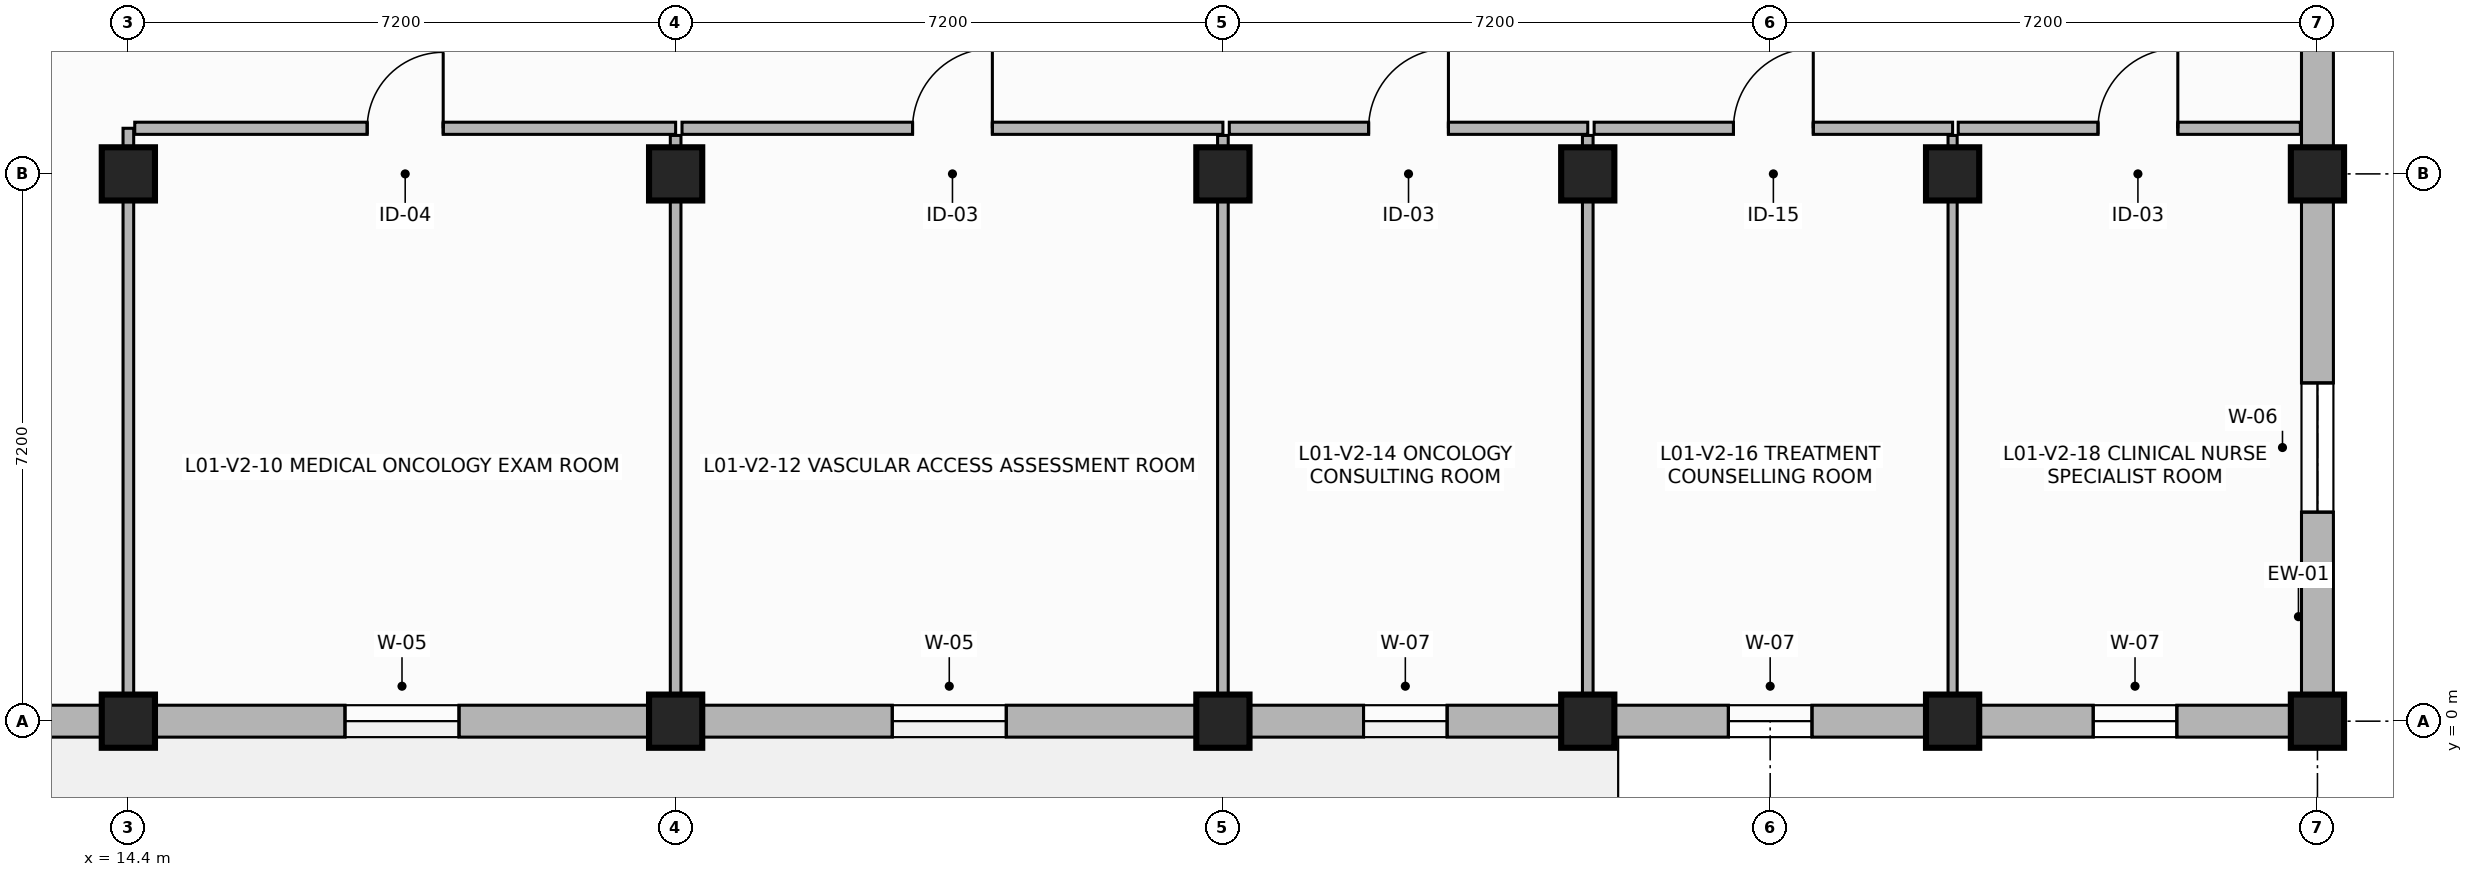
"""IFC4 building model, lengths in metres.
Left out: names, types, materials, properties, quantities, classifications, styles, units other than length and angle.
Written with IfcOpenShell. Run it as: python <this file> out.ifc"""

import sys

from ifc_helpers import new_model, si_unit, direction, frame, frame_2d, origin, origin_2d, place, context, subcontext, project, spatial, rectangle, extrude, element, fill, save


model = new_model("IFC4")
c1 = context("Model", 3, precision=1e-05, world=origin(), true_north=direction((0.0, 1.0)))
c2 = subcontext(c1, "Body", "Model", "MODEL_VIEW")
j1 = project(units=[si_unit("LENGTHUNIT", "METRE"), si_unit("PLANEANGLEUNIT", "RADIAN")], contexts=[c1])
p1 = place(None, origin())
s1 = spatial("IfcSite", under=j1, at=p1, CompositionType="ELEMENT")
p2 = place(p1, origin())
s2 = spatial("IfcBuilding", under=s1, at=p2, CompositionType="ELEMENT")
p3 = place(p2, frame((0.0, 0.0, 4.5)))
s3 = spatial("IfcBuildingStorey", under=s2, at=p3, CompositionType="ELEMENT", Elevation=4.5)
for number, where, z_axis, x_axis in (
    (1, (14.4, 0.0, 0.0), (0.0, 0.0, 1.0), (1.0, 0.0, 0.0)),
    (2, (14.4, 7.2, 0.0), (0.0, 0.0, 1.0), (1.0, 0.0, 0.0)),
    (3, (21.6, 0.0, 0.0), (0.0, 0.0, 1.0), (1.0, 0.0, 0.0)),
    (4, (21.6, 7.2, 0.0), (0.0, 0.0, 1.0), (1.0, 0.0, 0.0)),
    (5, (28.8, 0.0, 0.0), (0.0, 0.0, 1.0), (1.0, 0.0, 0.0)),
    (6, (28.8, 7.2, 0.0), (0.0, 0.0, 1.0), (1.0, 0.0, 0.0)),
    (7, (33.6, 0.0, 0.0), (0.0, 0.0, 1.0), (1.0, 0.0, 0.0)),
    (8, (33.6, 7.2, 0.0), (0.0, 0.0, 1.0), (1.0, 0.0, 0.0)),
    (9, (38.4, 0.0, 0.0), (0.0, 0.0, 1.0), (1.0, 0.0, 0.0)),
    (10, (38.4, 7.2, 0.0), (0.0, 0.0, 1.0), (1.0, 0.0, 0.0)),
    (11, (43.2, 0.0, 0.0), (0.0, 0.0, 1.0), (1.0, 0.0, 0.0)),
    (12, (43.2, 7.2, 0.0), (0.0, 0.0, 1.0), (1.0, 0.0, 0.0)),
):
    element("IfcColumn", number, at=place(p3, frame(where, z_axis=z_axis, x_axis=x_axis)), inside=s3, PredefinedType="COLUMN", context=c2, shape_type="SweptSolid", body=[
        extrude(rectangle(XDim=0.7, YDim=0.7, at=origin_2d()), origin(), (0.0, 0.0, 1.0), 3.62),
    ])
p4 = place(p3, frame((7.2, 0.0, 0.0), z_axis=(0.0, 0.0, 1.0), x_axis=(1.0, 0.0, 0.0)))
e13 = element("IfcWall", 13, at=p4, inside=s3, PredefinedType="SOLIDWALL", context=c2, shape_type="SweptSolid", body=[
    extrude(rectangle(XDim=7.2, YDim=0.42, at=frame_2d((3.6, 0.0))), origin(), (0.0, 0.0, 1.0), 3.0),
])
p5 = place(p4, frame((2.85, 0.0, 0.85)))
e14 = element("IfcOpeningElement", 14, at=p5, cuts=e13, PredefinedType="OPENING", context=c2, shape_type="SweptSolid", body=[
    extrude(rectangle(XDim=1.5, YDim=1.9, at=frame_2d((0.75, 0.95))), frame((0.0, 0.22, 0.0), z_axis=(0.0, -1.0, 0.0), x_axis=(1.0, 0.0, 0.0)), (0.0, 0.0, 1.0), 0.44),
])
p6 = place(p3, frame((14.4, 0.0, 0.0), z_axis=(0.0, 0.0, 1.0), x_axis=(1.0, 0.0, 0.0)))
e15 = element("IfcWall", 15, at=p6, inside=s3, PredefinedType="SOLIDWALL", context=c2, shape_type="SweptSolid", body=[
    extrude(rectangle(XDim=7.2, YDim=0.42, at=frame_2d((3.6, 0.0))), origin(), (0.0, 0.0, 1.0), 3.0),
])
p7 = place(p6, frame((2.85, 0.0, 0.85)))
e16 = element("IfcOpeningElement", 16, at=p7, cuts=e15, PredefinedType="OPENING", context=c2, shape_type="SweptSolid", body=[
    extrude(rectangle(XDim=1.5, YDim=1.9, at=frame_2d((0.75, 0.95))), frame((0.0, 0.22, 0.0), z_axis=(0.0, -1.0, 0.0), x_axis=(1.0, 0.0, 0.0)), (0.0, 0.0, 1.0), 0.44),
])
p8 = place(p3, frame((21.6, 0.0, 0.0), z_axis=(0.0, 0.0, 1.0), x_axis=(1.0, 0.0, 0.0)))
e17 = element("IfcWall", 17, at=p8, inside=s3, PredefinedType="SOLIDWALL", context=c2, shape_type="SweptSolid", body=[
    extrude(rectangle(XDim=7.2, YDim=0.42, at=frame_2d((3.6, 0.0))), origin(), (0.0, 0.0, 1.0), 3.0),
])
p9 = place(p8, frame((2.85, 0.0, 0.85)))
e18 = element("IfcOpeningElement", 18, at=p9, cuts=e17, PredefinedType="OPENING", context=c2, shape_type="SweptSolid", body=[
    extrude(rectangle(XDim=1.5, YDim=1.9, at=frame_2d((0.75, 0.95))), frame((0.0, 0.22, 0.0), z_axis=(0.0, -1.0, 0.0), x_axis=(1.0, 0.0, 0.0)), (0.0, 0.0, 1.0), 0.44),
])
p10 = place(p3, frame((28.8, 0.0, 0.0), z_axis=(0.0, 0.0, 1.0), x_axis=(1.0, 0.0, 0.0)))
e19 = element("IfcWall", 19, at=p10, inside=s3, PredefinedType="SOLIDWALL", context=c2, shape_type="SweptSolid", body=[
    extrude(rectangle(XDim=4.8, YDim=0.42, at=frame_2d((2.4, 0.0))), origin(), (0.0, 0.0, 1.0), 3.0),
])
p11 = place(p10, frame((1.85, 0.0, 0.85)))
e20 = element("IfcOpeningElement", 20, at=p11, cuts=e19, PredefinedType="OPENING", context=c2, shape_type="SweptSolid", body=[
    extrude(rectangle(XDim=1.1, YDim=1.85, at=frame_2d((0.55, 0.925))), frame((0.0, 0.22, 0.0), z_axis=(0.0, -1.0, 0.0), x_axis=(1.0, 0.0, 0.0)), (0.0, 0.0, 1.0), 0.44),
])
p12 = place(p3, frame((33.6, 0.0, 0.0), z_axis=(0.0, 0.0, 1.0), x_axis=(1.0, 0.0, 0.0)))
e21 = element("IfcWall", 21, at=p12, inside=s3, PredefinedType="SOLIDWALL", context=c2, shape_type="SweptSolid", body=[
    extrude(rectangle(XDim=4.8, YDim=0.42, at=frame_2d((2.4, 0.0))), origin(), (0.0, 0.0, 1.0), 3.0),
])
p13 = place(p12, frame((1.85, 0.0, 0.85)))
e22 = element("IfcOpeningElement", 22, at=p13, cuts=e21, PredefinedType="OPENING", context=c2, shape_type="SweptSolid", body=[
    extrude(rectangle(XDim=1.1, YDim=1.85, at=frame_2d((0.55, 0.925))), frame((0.0, 0.22, 0.0), z_axis=(0.0, -1.0, 0.0), x_axis=(1.0, 0.0, 0.0)), (0.0, 0.0, 1.0), 0.44),
])
p14 = place(p3, frame((38.4, 0.0, 0.0), z_axis=(0.0, 0.0, 1.0), x_axis=(1.0, 0.0, 0.0)))
e23 = element("IfcWall", 23, at=p14, inside=s3, PredefinedType="SOLIDWALL", context=c2, shape_type="SweptSolid", body=[
    extrude(rectangle(XDim=4.8, YDim=0.42, at=frame_2d((2.4, 0.0))), origin(), (0.0, 0.0, 1.0), 3.0),
])
p15 = place(p14, frame((1.85, 0.0, 0.85)))
e24 = element("IfcOpeningElement", 24, at=p15, cuts=e23, PredefinedType="OPENING", context=c2, shape_type="SweptSolid", body=[
    extrude(rectangle(XDim=1.1, YDim=1.85, at=frame_2d((0.55, 0.925))), frame((0.0, 0.22, 0.0), z_axis=(0.0, -1.0, 0.0), x_axis=(1.0, 0.0, 0.0)), (0.0, 0.0, 1.0), 0.44),
])
p16 = place(p3, frame((43.2, 0.0, 0.0), z_axis=(0.0, 0.0, 1.0), x_axis=(0.0, 1.0, 0.0)))
e25 = element("IfcWall", 25, at=p16, inside=s3, PredefinedType="SOLIDWALL", context=c2, shape_type="SweptSolid", body=[
    extrude(rectangle(XDim=7.2, YDim=0.42, at=frame_2d((3.6, 0.0))), origin(), (0.0, 0.0, 1.0), 3.0),
])
p17 = place(p16, frame((2.75, 0.0, 0.85)))
e26 = element("IfcOpeningElement", 26, at=p17, cuts=e25, PredefinedType="OPENING", context=c2, shape_type="SweptSolid", body=[
    extrude(rectangle(XDim=1.7, YDim=1.9, at=frame_2d((0.85, 0.95))), frame((0.0, 0.22, 0.0), z_axis=(0.0, -1.0, 0.0), x_axis=(1.0, 0.0, 0.0)), (0.0, 0.0, 1.0), 0.44),
])
p18 = place(p3, frame((43.2, 7.2, 0.0), z_axis=(0.0, 0.0, 1.0), x_axis=(0.0, 1.0, 0.0)))
e27 = element("IfcWall", 27, at=p18, inside=s3, PredefinedType="SOLIDWALL", context=c2, shape_type="SweptSolid", body=[
    extrude(rectangle(XDim=7.2, YDim=0.42, at=frame_2d((3.6, 0.0))), origin(), (0.0, 0.0, 1.0), 3.0),
])
p19 = place(p18, frame((4.35, 0.0, 0.85)))
e28 = element("IfcOpeningElement", 28, at=p19, cuts=e27, PredefinedType="OPENING", context=c2, shape_type="SweptSolid", body=[
    extrude(rectangle(XDim=1.7, YDim=1.9, at=frame_2d((0.85, 0.95))), frame((0.0, 0.22, 0.0), z_axis=(0.0, -1.0, 0.0), x_axis=(1.0, 0.0, 0.0)), (0.0, 0.0, 1.0), 0.44),
])
p20 = place(p3, frame((14.4, 0.225, 0.0), z_axis=(0.0, 0.0, 1.0), x_axis=(0.0, 1.0, 0.0)))
e29 = element("IfcWall", 29, at=p20, inside=s3, PredefinedType="PARTITIONING", context=c2, shape_type="SweptSolid", body=[
    extrude(rectangle(XDim=7.575, YDim=0.14, at=frame_2d((3.788, 0.0))), origin(), (0.0, 0.0, 1.0), 2.98),
])
p21 = place(p3, frame((14.484, 7.8, 0.0), z_axis=(0.0, 0.0, 1.0), x_axis=(1.0, 0.0, 0.0)))
e30 = element("IfcWall", 30, at=p21, inside=s3, PredefinedType="PARTITIONING", context=c2, shape_type="SweptSolid", body=[
    extrude(rectangle(XDim=7.116, YDim=0.16, at=frame_2d((3.558, 0.0))), origin(), (0.0, 0.0, 1.0), 2.98),
])
p22 = place(p21, frame((3.058, 0.0, 0.0)))
e31 = element("IfcOpeningElement", 31, at=p22, cuts=e30, PredefinedType="OPENING", context=c2, shape_type="SweptSolid", body=[
    extrude(rectangle(XDim=1.0, YDim=2.15, at=frame_2d((0.5, 1.075))), frame((0.0, 0.09, 0.0), z_axis=(0.0, -1.0, 0.0), x_axis=(1.0, 0.0, 0.0)), (0.0, 0.0, 1.0), 0.18),
])
p23 = place(p3, frame((21.6, 7.706, 0.0), z_axis=(0.0, 0.0, 1.0), x_axis=(0.0, -1.0, 0.0)))
e32 = element("IfcWall", 32, at=p23, inside=s3, PredefinedType="PARTITIONING", context=c2, shape_type="SweptSolid", body=[
    extrude(rectangle(XDim=7.481, YDim=0.14, at=frame_2d((3.74, 0.0))), origin(), (0.0, 0.0, 1.0), 2.98),
])
p24 = place(p3, frame((21.684, 7.8, 0.0), z_axis=(0.0, 0.0, 1.0), x_axis=(1.0, 0.0, 0.0)))
e33 = element("IfcWall", 33, at=p24, inside=s3, PredefinedType="PARTITIONING", context=c2, shape_type="SweptSolid", body=[
    extrude(rectangle(XDim=7.116, YDim=0.16, at=frame_2d((3.558, 0.0))), origin(), (0.0, 0.0, 1.0), 2.98),
])
p25 = place(p24, frame((3.033, 0.0, 0.0)))
e34 = element("IfcOpeningElement", 34, at=p25, cuts=e33, PredefinedType="OPENING", context=c2, shape_type="SweptSolid", body=[
    extrude(rectangle(XDim=1.05, YDim=2.15, at=frame_2d((0.525, 1.075))), frame((0.0, 0.09, 0.0), z_axis=(0.0, -1.0, 0.0), x_axis=(1.0, 0.0, 0.0)), (0.0, 0.0, 1.0), 0.18),
])
p26 = place(p3, frame((28.8, 7.706, 0.0), z_axis=(0.0, 0.0, 1.0), x_axis=(0.0, -1.0, 0.0)))
e35 = element("IfcWall", 35, at=p26, inside=s3, PredefinedType="PARTITIONING", context=c2, shape_type="SweptSolid", body=[
    extrude(rectangle(XDim=7.481, YDim=0.14, at=frame_2d((3.74, 0.0))), origin(), (0.0, 0.0, 1.0), 2.98),
])
p27 = place(p3, frame((28.884, 7.8, 0.0), z_axis=(0.0, 0.0, 1.0), x_axis=(1.0, 0.0, 0.0)))
e36 = element("IfcWall", 36, at=p27, inside=s3, PredefinedType="PARTITIONING", context=c2, shape_type="SweptSolid", body=[
    extrude(rectangle(XDim=4.716, YDim=0.16, at=frame_2d((2.358, 0.0))), origin(), (0.0, 0.0, 1.0), 2.98),
])
p28 = place(p27, frame((1.833, 0.0, 0.0)))
e37 = element("IfcOpeningElement", 37, at=p28, cuts=e36, PredefinedType="OPENING", context=c2, shape_type="SweptSolid", body=[
    extrude(rectangle(XDim=1.05, YDim=2.15, at=frame_2d((0.525, 1.075))), frame((0.0, 0.09, 0.0), z_axis=(0.0, -1.0, 0.0), x_axis=(1.0, 0.0, 0.0)), (0.0, 0.0, 1.0), 0.18),
])
p29 = place(p3, frame((33.6, 7.706, 0.0), z_axis=(0.0, 0.0, 1.0), x_axis=(0.0, -1.0, 0.0)))
e38 = element("IfcWall", 38, at=p29, inside=s3, PredefinedType="PARTITIONING", context=c2, shape_type="SweptSolid", body=[
    extrude(rectangle(XDim=7.481, YDim=0.14, at=frame_2d((3.74, 0.0))), origin(), (0.0, 0.0, 1.0), 2.98),
])
p30 = place(p3, frame((33.684, 7.8, 0.0), z_axis=(0.0, 0.0, 1.0), x_axis=(1.0, 0.0, 0.0)))
e39 = element("IfcWall", 39, at=p30, inside=s3, PredefinedType="PARTITIONING", context=c2, shape_type="SweptSolid", body=[
    extrude(rectangle(XDim=4.716, YDim=0.16, at=frame_2d((2.358, 0.0))), origin(), (0.0, 0.0, 1.0), 2.98),
])
p31 = place(p30, frame((1.833, 0.0, 0.0)))
e40 = element("IfcOpeningElement", 40, at=p31, cuts=e39, PredefinedType="OPENING", context=c2, shape_type="SweptSolid", body=[
    extrude(rectangle(XDim=1.05, YDim=2.2, at=frame_2d((0.525, 1.1))), frame((0.0, 0.09, 0.0), z_axis=(0.0, -1.0, 0.0), x_axis=(1.0, 0.0, 0.0)), (0.0, 0.0, 1.0), 0.18),
])
p32 = place(p3, frame((38.4, 7.706, 0.0), z_axis=(0.0, 0.0, 1.0), x_axis=(0.0, -1.0, 0.0)))
e41 = element("IfcWall", 41, at=p32, inside=s3, PredefinedType="PARTITIONING", context=c2, shape_type="SweptSolid", body=[
    extrude(rectangle(XDim=7.481, YDim=0.12, at=frame_2d((3.74, 0.0))), origin(), (0.0, 0.0, 1.0), 2.98),
])
p33 = place(p3, frame((38.474, 7.8, 0.0), z_axis=(0.0, 0.0, 1.0), x_axis=(1.0, 0.0, 0.0)))
e42 = element("IfcWall", 42, at=p33, inside=s3, PredefinedType="PARTITIONING", context=c2, shape_type="SweptSolid", body=[
    extrude(rectangle(XDim=4.501, YDim=0.16, at=frame_2d((2.25, 0.0))), origin(), (0.0, 0.0, 1.0), 2.98),
])
p34 = place(p33, frame((1.839, 0.0, 0.0)))
e43 = element("IfcOpeningElement", 43, at=p34, cuts=e42, PredefinedType="OPENING", context=c2, shape_type="SweptSolid", body=[
    extrude(rectangle(XDim=1.05, YDim=2.15, at=frame_2d((0.525, 1.075))), frame((0.0, 0.09, 0.0), z_axis=(0.0, -1.0, 0.0), x_axis=(1.0, 0.0, 0.0)), (0.0, 0.0, 1.0), 0.18),
])
p35 = place(p7, origin())
e44 = element("IfcWindow", 44, at=p35, inside=s3, PartitioningType="SINGLE_PANEL", PredefinedType="WINDOW", context=c2, shape_type="SweptSolid", body=[
    extrude(rectangle(XDim=1.5, YDim=1.9, at=frame_2d((0.75, 0.95))), frame((0.0, 0.03, 0.0), z_axis=(0.0, -1.0, 0.0), x_axis=(1.0, 0.0, 0.0)), (0.0, 0.0, 1.0), 0.06),
])
fill(e16, e44)
p36 = place(p9, origin())
e45 = element("IfcWindow", 45, at=p36, inside=s3, PartitioningType="SINGLE_PANEL", PredefinedType="WINDOW", context=c2, shape_type="SweptSolid", body=[
    extrude(rectangle(XDim=1.5, YDim=1.9, at=frame_2d((0.75, 0.95))), frame((0.0, 0.03, 0.0), z_axis=(0.0, -1.0, 0.0), x_axis=(1.0, 0.0, 0.0)), (0.0, 0.0, 1.0), 0.06),
])
fill(e18, e45)
p37 = place(p11, origin())
e46 = element("IfcWindow", 46, at=p37, inside=s3, PartitioningType="SINGLE_PANEL", PredefinedType="WINDOW", context=c2, shape_type="SweptSolid", body=[
    extrude(rectangle(XDim=1.1, YDim=1.85, at=frame_2d((0.55, 0.925))), frame((0.0, 0.03, 0.0), z_axis=(0.0, -1.0, 0.0), x_axis=(1.0, 0.0, 0.0)), (0.0, 0.0, 1.0), 0.06),
])
fill(e20, e46)
p38 = place(p13, origin())
e47 = element("IfcWindow", 47, at=p38, inside=s3, PartitioningType="SINGLE_PANEL", PredefinedType="WINDOW", context=c2, shape_type="SweptSolid", body=[
    extrude(rectangle(XDim=1.1, YDim=1.85, at=frame_2d((0.55, 0.925))), frame((0.0, 0.03, 0.0), z_axis=(0.0, -1.0, 0.0), x_axis=(1.0, 0.0, 0.0)), (0.0, 0.0, 1.0), 0.06),
])
fill(e22, e47)
p39 = place(p15, origin())
e48 = element("IfcWindow", 48, at=p39, inside=s3, PartitioningType="SINGLE_PANEL", PredefinedType="WINDOW", context=c2, shape_type="SweptSolid", body=[
    extrude(rectangle(XDim=1.1, YDim=1.85, at=frame_2d((0.55, 0.925))), frame((0.0, 0.03, 0.0), z_axis=(0.0, -1.0, 0.0), x_axis=(1.0, 0.0, 0.0)), (0.0, 0.0, 1.0), 0.06),
])
fill(e24, e48)
p40 = place(p17, origin())
e49 = element("IfcWindow", 49, at=p40, inside=s3, PartitioningType="SINGLE_PANEL", PredefinedType="WINDOW", context=c2, shape_type="SweptSolid", body=[
    extrude(rectangle(XDim=1.7, YDim=1.9, at=frame_2d((0.85, 0.95))), frame((0.0, 0.03, 0.0), z_axis=(0.0, -1.0, 0.0), x_axis=(1.0, 0.0, 0.0)), (0.0, 0.0, 1.0), 0.06),
])
fill(e26, e49)
p41 = place(p22, origin())
e50 = element("IfcDoor", 50, at=p41, inside=s3, OperationType="SINGLE_SWING_RIGHT", PredefinedType="DOOR", context=c2, shape_type="SweptSolid", body=[
    extrude(rectangle(XDim=1.0, YDim=2.15, at=frame_2d((0.5, 1.075))), frame((0.0, 0.025, 0.0), z_axis=(0.0, -1.0, 0.0), x_axis=(1.0, 0.0, 0.0)), (0.0, 0.0, 1.0), 0.05),
])
fill(e31, e50)
p42 = place(p25, origin())
e51 = element("IfcDoor", 51, at=p42, inside=s3, OperationType="SINGLE_SWING_RIGHT", PredefinedType="DOOR", context=c2, shape_type="SweptSolid", body=[
    extrude(rectangle(XDim=1.05, YDim=2.15, at=frame_2d((0.525, 1.075))), frame((0.0, 0.025, 0.0), z_axis=(0.0, -1.0, 0.0), x_axis=(1.0, 0.0, 0.0)), (0.0, 0.0, 1.0), 0.05),
])
fill(e34, e51)
p43 = place(p28, origin())
e52 = element("IfcDoor", 52, at=p43, inside=s3, OperationType="SINGLE_SWING_RIGHT", PredefinedType="DOOR", context=c2, shape_type="SweptSolid", body=[
    extrude(rectangle(XDim=1.05, YDim=2.15, at=frame_2d((0.525, 1.075))), frame((0.0, 0.025, 0.0), z_axis=(0.0, -1.0, 0.0), x_axis=(1.0, 0.0, 0.0)), (0.0, 0.0, 1.0), 0.05),
])
fill(e37, e52)
p44 = place(p31, origin())
e53 = element("IfcDoor", 53, at=p44, inside=s3, OperationType="SINGLE_SWING_RIGHT", PredefinedType="DOOR", context=c2, shape_type="SweptSolid", body=[
    extrude(rectangle(XDim=1.05, YDim=2.2, at=frame_2d((0.525, 1.1))), frame((0.0, 0.025, 0.0), z_axis=(0.0, -1.0, 0.0), x_axis=(1.0, 0.0, 0.0)), (0.0, 0.0, 1.0), 0.05),
])
fill(e40, e53)
p45 = place(p34, origin())
e54 = element("IfcDoor", 54, at=p45, inside=s3, OperationType="SINGLE_SWING_RIGHT", PredefinedType="DOOR", context=c2, shape_type="SweptSolid", body=[
    extrude(rectangle(XDim=1.05, YDim=2.15, at=frame_2d((0.525, 1.075))), frame((0.0, 0.025, 0.0), z_axis=(0.0, -1.0, 0.0), x_axis=(1.0, 0.0, 0.0)), (0.0, 0.0, 1.0), 0.05),
])
fill(e43, e54)
save(model, sys.argv[1])
